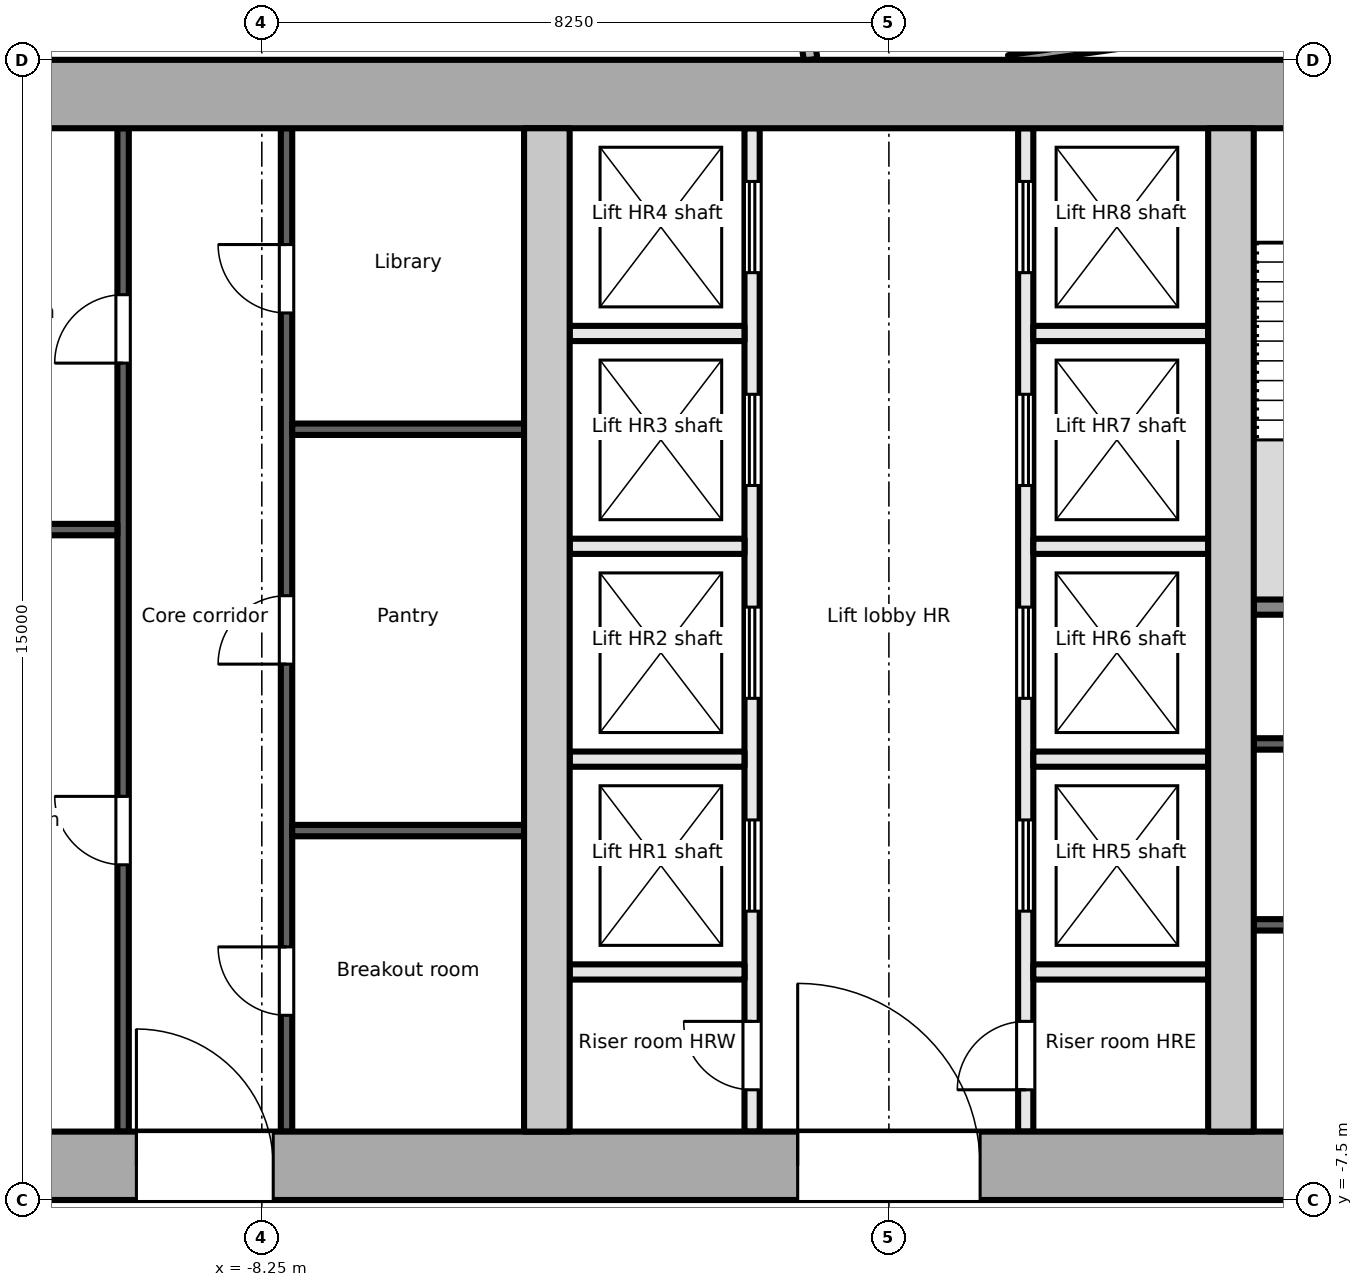
"""IFC4 building model, lengths in metres.
Left out: names, types, materials, properties, quantities, classifications, styles, units other than length and angle.
Written with IfcOpenShell. Run it as: python <this file> out.ifc"""

import sys

from ifc_helpers import new_model, si_unit, direction, frame, frame_2d, origin, place, context, subcontext, project, spatial, rectangle, extrude, element, fill, save


model = new_model("IFC4")
c1 = context("Model", 3, precision=1e-05, world=origin(), true_north=direction((0.0, 1.0)))
c2 = subcontext(c1, "Body", "Model", "MODEL_VIEW")
j1 = project(units=[si_unit("LENGTHUNIT", "METRE"), si_unit("PLANEANGLEUNIT", "RADIAN")], contexts=[c1])
p1 = place(None, origin())
s1 = spatial("IfcSite", under=j1, at=p1, CompositionType="ELEMENT")
p2 = place(p1, origin())
s2 = spatial("IfcBuilding", under=s1, at=p2, CompositionType="ELEMENT")
p3 = place(p2, frame((0.0, 0.0, 282.4)))
s3 = spatial("IfcBuildingStorey", under=s2, at=p3, CompositionType="ELEMENT", Elevation=282.4)
p4 = place(p3, frame((-18.0, -7.05, -0.2), z_axis=(0.0, 0.0, 1.0), x_axis=(1.0, 0.0, 0.0)))
e1 = element("IfcWall", 1, at=p4, inside=s3, PredefinedType="SHEAR", context=c2, shape_type="SweptSolid", body=[
    extrude(rectangle(XDim=36.0, YDim=0.9, at=frame_2d((18.0, 0.0))), origin(), (0.0, 0.0, 1.0), 3.9),
])
p5 = place(p4, frame((8.1, 0.0, 0.2)))
e2 = element("IfcOpeningElement", 2, at=p5, cuts=e1, PredefinedType="OPENING", context=c2, shape_type="SweptSolid", body=[
    extrude(rectangle(XDim=1.8, YDim=2.1, at=frame_2d((0.9, 1.05))), frame((0.0, 0.46, 0.0), z_axis=(0.0, -1.0, 0.0), x_axis=(1.0, 0.0, 0.0)), (0.0, 0.0, 1.0), 0.921),
])
p6 = place(p4, frame((16.8, 0.0, 0.2)))
e3 = element("IfcOpeningElement", 3, at=p6, cuts=e1, PredefinedType="OPENING", context=c2, shape_type="SweptSolid", body=[
    extrude(rectangle(XDim=2.4, YDim=2.1, at=frame_2d((1.2, 1.05))), frame((0.0, 0.46, 0.0), z_axis=(0.0, -1.0, 0.0), x_axis=(1.0, 0.0, 0.0)), (0.0, 0.0, 1.0), 0.921),
])
p7 = place(p4, frame((26.1, 0.0, 0.2)))
e4 = element("IfcOpeningElement", 4, at=p7, cuts=e1, PredefinedType="OPENING", context=c2, shape_type="SweptSolid", body=[
    extrude(rectangle(XDim=2.4, YDim=2.1, at=frame_2d((1.2, 1.05))), frame((0.0, 0.46, 0.0), z_axis=(0.0, -1.0, 0.0), x_axis=(1.0, 0.0, 0.0)), (0.0, 0.0, 1.0), 0.921),
])
p8 = place(p3, frame((-18.0, 7.05, -0.2), z_axis=(0.0, 0.0, 1.0), x_axis=(1.0, 0.0, 0.0)))
e5 = element("IfcWall", 5, at=p8, inside=s3, PredefinedType="SHEAR", context=c2, shape_type="SweptSolid", body=[
    extrude(rectangle(XDim=36.0, YDim=0.9, at=frame_2d((18.0, 0.0))), origin(), (0.0, 0.0, 1.0), 3.9),
])
for number, where, z_axis, x_axis in (
    (6, (-4.5, -6.6, -0.2), (0.0, 0.0, 1.0), (0.0, 1.0, 0.0)),
    (7, (4.5, -6.6, -0.2), (0.0, 0.0, 1.0), (0.0, 1.0, 0.0)),
):
    element("IfcWall", number, at=place(p3, frame(where, z_axis=z_axis, x_axis=x_axis)), inside=s3, PredefinedType="SHEAR", context=c2, shape_type="SweptSolid", body=[
        extrude(rectangle(XDim=13.2, YDim=0.6, at=frame_2d((6.6, 0.0))), origin(), (0.0, 0.0, 1.0), 3.9),
    ])
p9 = place(p3, frame((-10.075, -6.6, 0.0), z_axis=(0.0, 0.0, 1.0), x_axis=(0.0, 1.0, 0.0)))
e8 = element("IfcWall", 8, at=p9, inside=s3, PredefinedType="PARTITIONING", context=c2, shape_type="SweptSolid", body=[
    extrude(rectangle(XDim=13.2, YDim=0.15, at=frame_2d((6.6, 0.0))), origin(), (0.0, 0.0, 1.0), 3.7),
])
p10 = place(p9, frame((3.51, 0.0, 0.0)))
e9 = element("IfcOpeningElement", 9, at=p10, cuts=e8, PredefinedType="OPENING", context=c2, shape_type="SweptSolid", body=[
    extrude(rectangle(XDim=0.9, YDim=2.1, at=frame_2d((0.45, 1.05))), frame((0.0, 0.085, 0.0), z_axis=(0.0, -1.0, 0.0), x_axis=(1.0, 0.0, 0.0)), (0.0, 0.0, 1.0), 0.171),
])
p11 = place(p9, frame((10.11, 0.0, 0.0)))
e10 = element("IfcOpeningElement", 10, at=p11, cuts=e8, PredefinedType="OPENING", context=c2, shape_type="SweptSolid", body=[
    extrude(rectangle(XDim=0.9, YDim=2.1, at=frame_2d((0.45, 1.05))), frame((0.0, 0.085, 0.0), z_axis=(0.0, -1.0, 0.0), x_axis=(1.0, 0.0, 0.0)), (0.0, 0.0, 1.0), 0.171),
])
p12 = place(p3, frame((-13.2, 1.32, 0.0), z_axis=(0.0, 0.0, 1.0), x_axis=(1.0, 0.0, 0.0)))
e11 = element("IfcWall", 11, at=p12, inside=s3, PredefinedType="PARTITIONING", context=c2, shape_type="SweptSolid", body=[
    extrude(rectangle(XDim=3.05, YDim=0.15, at=frame_2d((1.525, 0.0))), origin(), (0.0, 0.0, 1.0), 3.7),
])
p13 = place(p3, frame((-7.925, -6.6, 0.0), z_axis=(0.0, 0.0, 1.0), x_axis=(0.0, 1.0, 0.0)))
e12 = element("IfcWall", 12, at=p13, inside=s3, PredefinedType="PARTITIONING", context=c2, shape_type="SweptSolid", body=[
    extrude(rectangle(XDim=13.2, YDim=0.15, at=frame_2d((6.6, 0.0))), origin(), (0.0, 0.0, 1.0), 3.7),
])
p14 = place(p13, frame((1.53, 0.0, 0.0)))
e13 = element("IfcOpeningElement", 13, at=p14, cuts=e12, PredefinedType="OPENING", context=c2, shape_type="SweptSolid", body=[
    extrude(rectangle(XDim=0.9, YDim=2.1, at=frame_2d((0.45, 1.05))), frame((0.0, 0.085, 0.0), z_axis=(0.0, -1.0, 0.0), x_axis=(1.0, 0.0, 0.0)), (0.0, 0.0, 1.0), 0.171),
])
p15 = place(p13, frame((6.15, 0.0, 0.0)))
e14 = element("IfcOpeningElement", 14, at=p15, cuts=e12, PredefinedType="OPENING", context=c2, shape_type="SweptSolid", body=[
    extrude(rectangle(XDim=0.9, YDim=2.1, at=frame_2d((0.45, 1.05))), frame((0.0, 0.085, 0.0), z_axis=(0.0, -1.0, 0.0), x_axis=(1.0, 0.0, 0.0)), (0.0, 0.0, 1.0), 0.171),
])
p16 = place(p13, frame((10.77, 0.0, 0.0)))
e15 = element("IfcOpeningElement", 15, at=p16, cuts=e12, PredefinedType="OPENING", context=c2, shape_type="SweptSolid", body=[
    extrude(rectangle(XDim=0.9, YDim=2.1, at=frame_2d((0.45, 1.05))), frame((0.0, 0.085, 0.0), z_axis=(0.0, -1.0, 0.0), x_axis=(1.0, 0.0, 0.0)), (0.0, 0.0, 1.0), 0.171),
])
for number, where, z_axis, x_axis in (
    (16, (-7.85, -2.64, 0.0), (0.0, 0.0, 1.0), (1.0, 0.0, 0.0)),
    (17, (-7.85, 2.64, 0.0), (0.0, 0.0, 1.0), (1.0, 0.0, 0.0)),
):
    element("IfcWall", number, at=place(p3, frame(where, z_axis=z_axis, x_axis=x_axis)), inside=s3, PredefinedType="PARTITIONING", context=c2, shape_type="SweptSolid", body=[
        extrude(rectangle(XDim=3.05, YDim=0.15, at=frame_2d((1.525, 0.0))), origin(), (0.0, 0.0, 1.0), 3.7),
    ])
p17 = place(p3, frame((-1.8, -6.6, 0.0), z_axis=(0.0, 0.0, 1.0), x_axis=(0.0, 1.0, 0.0)))
e18 = element("IfcWall", 18, at=p17, inside=s3, PredefinedType="PARTITIONING", context=c2, shape_type="SweptSolid", body=[
    extrude(rectangle(XDim=13.2, YDim=0.2, at=frame_2d((6.6, 0.0))), origin(), (0.0, 0.0, 1.0), 3.7),
])
p18 = place(p17, frame((0.55, 0.0, 0.0)))
e19 = element("IfcOpeningElement", 19, at=p18, cuts=e18, PredefinedType="OPENING", context=c2, shape_type="SweptSolid", body=[
    extrude(rectangle(XDim=0.9, YDim=2.1, at=frame_2d((0.45, 1.05))), frame((0.0, 0.111, 0.0), z_axis=(0.0, -1.0, 0.0), x_axis=(1.0, 0.0, 0.0)), (0.0, 0.0, 1.0), 0.221),
])
p19 = place(p17, frame((2.9, 0.0, 0.0)))
e20 = element("IfcOpeningElement", 20, at=p19, cuts=e18, PredefinedType="OPENING", context=c2, shape_type="SweptSolid", body=[
    extrude(rectangle(XDim=1.2, YDim=2.1, at=frame_2d((0.6, 1.05))), frame((0.0, 0.111, 0.0), z_axis=(0.0, -1.0, 0.0), x_axis=(1.0, 0.0, 0.0)), (0.0, 0.0, 1.0), 0.221),
])
p20 = place(p17, frame((5.7, 0.0, 0.0)))
e21 = element("IfcOpeningElement", 21, at=p20, cuts=e18, PredefinedType="OPENING", context=c2, shape_type="SweptSolid", body=[
    extrude(rectangle(XDim=1.2, YDim=2.1, at=frame_2d((0.6, 1.05))), frame((0.0, 0.111, 0.0), z_axis=(0.0, -1.0, 0.0), x_axis=(1.0, 0.0, 0.0)), (0.0, 0.0, 1.0), 0.221),
])
p21 = place(p17, frame((8.5, 0.0, 0.0)))
e22 = element("IfcOpeningElement", 22, at=p21, cuts=e18, PredefinedType="OPENING", context=c2, shape_type="SweptSolid", body=[
    extrude(rectangle(XDim=1.2, YDim=2.1, at=frame_2d((0.6, 1.05))), frame((0.0, 0.111, 0.0), z_axis=(0.0, -1.0, 0.0), x_axis=(1.0, 0.0, 0.0)), (0.0, 0.0, 1.0), 0.221),
])
p22 = place(p17, frame((11.3, 0.0, 0.0)))
e23 = element("IfcOpeningElement", 23, at=p22, cuts=e18, PredefinedType="OPENING", context=c2, shape_type="SweptSolid", body=[
    extrude(rectangle(XDim=1.2, YDim=2.1, at=frame_2d((0.6, 1.05))), frame((0.0, 0.111, 0.0), z_axis=(0.0, -1.0, 0.0), x_axis=(1.0, 0.0, 0.0)), (0.0, 0.0, 1.0), 0.221),
])
p23 = place(p3, frame((1.8, -6.6, 0.0), z_axis=(0.0, 0.0, 1.0), x_axis=(0.0, 1.0, 0.0)))
e24 = element("IfcWall", 24, at=p23, inside=s3, PredefinedType="PARTITIONING", context=c2, shape_type="SweptSolid", body=[
    extrude(rectangle(XDim=13.2, YDim=0.2, at=frame_2d((6.6, 0.0))), origin(), (0.0, 0.0, 1.0), 3.7),
])
p24 = place(p23, frame((0.55, 0.0, 0.0)))
e25 = element("IfcOpeningElement", 25, at=p24, cuts=e24, PredefinedType="OPENING", context=c2, shape_type="SweptSolid", body=[
    extrude(rectangle(XDim=0.9, YDim=2.1, at=frame_2d((0.45, 1.05))), frame((0.0, 0.111, 0.0), z_axis=(0.0, -1.0, 0.0), x_axis=(1.0, 0.0, 0.0)), (0.0, 0.0, 1.0), 0.221),
])
p25 = place(p23, frame((2.9, 0.0, 0.0)))
e26 = element("IfcOpeningElement", 26, at=p25, cuts=e24, PredefinedType="OPENING", context=c2, shape_type="SweptSolid", body=[
    extrude(rectangle(XDim=1.2, YDim=2.1, at=frame_2d((0.6, 1.05))), frame((0.0, 0.111, 0.0), z_axis=(0.0, -1.0, 0.0), x_axis=(1.0, 0.0, 0.0)), (0.0, 0.0, 1.0), 0.221),
])
p26 = place(p23, frame((5.7, 0.0, 0.0)))
e27 = element("IfcOpeningElement", 27, at=p26, cuts=e24, PredefinedType="OPENING", context=c2, shape_type="SweptSolid", body=[
    extrude(rectangle(XDim=1.2, YDim=2.1, at=frame_2d((0.6, 1.05))), frame((0.0, 0.111, 0.0), z_axis=(0.0, -1.0, 0.0), x_axis=(1.0, 0.0, 0.0)), (0.0, 0.0, 1.0), 0.221),
])
p27 = place(p23, frame((8.5, 0.0, 0.0)))
e28 = element("IfcOpeningElement", 28, at=p27, cuts=e24, PredefinedType="OPENING", context=c2, shape_type="SweptSolid", body=[
    extrude(rectangle(XDim=1.2, YDim=2.1, at=frame_2d((0.6, 1.05))), frame((0.0, 0.111, 0.0), z_axis=(0.0, -1.0, 0.0), x_axis=(1.0, 0.0, 0.0)), (0.0, 0.0, 1.0), 0.221),
])
p28 = place(p23, frame((11.3, 0.0, 0.0)))
e29 = element("IfcOpeningElement", 29, at=p28, cuts=e24, PredefinedType="OPENING", context=c2, shape_type="SweptSolid", body=[
    extrude(rectangle(XDim=1.2, YDim=2.1, at=frame_2d((0.6, 1.05))), frame((0.0, 0.111, 0.0), z_axis=(0.0, -1.0, 0.0), x_axis=(1.0, 0.0, 0.0)), (0.0, 0.0, 1.0), 0.221),
])
for number, where, z_axis, x_axis in (
    (30, (-4.2, -1.7, 0.0), (0.0, 0.0, 1.0), (1.0, 0.0, 0.0)),
    (31, (-4.2, 1.1, 0.0), (0.0, 0.0, 1.0), (1.0, 0.0, 0.0)),
    (32, (-4.2, 3.9, 0.0), (0.0, 0.0, 1.0), (1.0, 0.0, 0.0)),
    (33, (-4.2, -4.5, 0.0), (0.0, 0.0, 1.0), (1.0, 0.0, 0.0)),
    (34, (1.9, -1.7, 0.0), (0.0, 0.0, 1.0), (1.0, 0.0, 0.0)),
    (35, (1.9, 1.1, 0.0), (0.0, 0.0, 1.0), (1.0, 0.0, 0.0)),
    (36, (1.9, 3.9, 0.0), (0.0, 0.0, 1.0), (1.0, 0.0, 0.0)),
    (37, (1.9, -4.5, 0.0), (0.0, 0.0, 1.0), (1.0, 0.0, 0.0)),
):
    element("IfcWall", number, at=place(p3, frame(where, z_axis=z_axis, x_axis=x_axis)), inside=s3, PredefinedType="PARTITIONING", context=c2, shape_type="SweptSolid", body=[
        extrude(rectangle(XDim=2.3, YDim=0.2, at=frame_2d((1.15, 0.0))), origin(), (0.0, 0.0, 1.0), 3.7),
    ])
p29 = place(p3, frame((4.8, 0.3, 0.0), z_axis=(0.0, 0.0, 1.0), x_axis=(1.0, 0.0, 0.0)))
e38 = element("IfcWall", 38, at=p29, inside=s3, PredefinedType="PARTITIONING", context=c2, shape_type="SweptSolid", body=[
    extrude(rectangle(XDim=3.15, YDim=0.2, at=frame_2d((1.575, 0.0))), origin(), (0.0, 0.0, 1.0), 3.7),
])
for number, where, z_axis, x_axis in (
    (39, (4.8, -3.88, 0.0), (0.0, 0.0, 1.0), (1.0, 0.0, 0.0)),
    (40, (4.8, -1.5, 0.0), (0.0, 0.0, 1.0), (1.0, 0.0, 0.0)),
):
    element("IfcWall", number, at=place(p3, frame(where, z_axis=z_axis, x_axis=x_axis)), inside=s3, PredefinedType="PARTITIONING", context=c2, shape_type="SweptSolid", body=[
        extrude(rectangle(XDim=3.15, YDim=0.15, at=frame_2d((1.575, 0.0))), origin(), (0.0, 0.0, 1.0), 3.7),
    ])
p30 = place(p3, frame((-1.312, 9.506, 0.0), z_axis=(0.0, 0.0, 1.0), x_axis=(0.139193896019, -0.990265145964, 0.0)))
e41 = element("IfcWall", 41, at=p30, inside=s3, PredefinedType="PARTITIONING", context=c2, shape_type="SweptSolid", body=[
    extrude(rectangle(XDim=2.026, YDim=0.18, at=frame_2d((1.013, 0.0))), origin(), (0.0, 0.0, 1.0), 3.7),
])
p31 = place(p3, frame((1.576, 7.502, 0.0), z_axis=(0.0, 0.0, 1.0), x_axis=(0.990319013032, 0.138810130855, 0.0)))
e42 = element("IfcWall", 42, at=p31, inside=s3, PredefinedType="PARTITIONING", context=c2, shape_type="SweptSolid", body=[
    extrude(rectangle(XDim=1.859, YDim=0.12, at=frame_2d((0.93, 0.0))), origin(), (0.0, 0.0, 1.0), 3.7),
])
p32 = place(p10, origin())
e43 = element("IfcDoor", 43, at=p32, inside=s3, OperationType="SINGLE_SWING_RIGHT", PredefinedType="DOOR", context=c2, shape_type="SweptSolid", body=[
    extrude(rectangle(XDim=0.9, YDim=2.1, at=frame_2d((0.45, 1.05))), frame((0.0, 0.025, 0.0), z_axis=(0.0, -1.0, 0.0), x_axis=(1.0, 0.0, 0.0)), (0.0, 0.0, 1.0), 0.05),
])
fill(e9, e43)
p33 = place(p11, origin())
e44 = element("IfcDoor", 44, at=p33, inside=s3, OperationType="SINGLE_SWING_LEFT", PredefinedType="DOOR", context=c2, shape_type="SweptSolid", body=[
    extrude(rectangle(XDim=0.9, YDim=2.1, at=frame_2d((0.45, 1.05))), frame((0.0, 0.025, 0.0), z_axis=(0.0, -1.0, 0.0), x_axis=(1.0, 0.0, 0.0)), (0.0, 0.0, 1.0), 0.05),
])
fill(e10, e44)
p34 = place(p14, origin())
e45 = element("IfcDoor", 45, at=p34, inside=s3, OperationType="SINGLE_SWING_RIGHT", PredefinedType="DOOR", context=c2, shape_type="SweptSolid", body=[
    extrude(rectangle(XDim=0.9, YDim=2.1, at=frame_2d((0.45, 1.05))), frame((0.0, 0.025, 0.0), z_axis=(0.0, -1.0, 0.0), x_axis=(1.0, 0.0, 0.0)), (0.0, 0.0, 1.0), 0.05),
])
fill(e13, e45)
p35 = place(p15, origin())
e46 = element("IfcDoor", 46, at=p35, inside=s3, OperationType="SINGLE_SWING_LEFT", PredefinedType="DOOR", context=c2, shape_type="SweptSolid", body=[
    extrude(rectangle(XDim=0.9, YDim=2.1, at=frame_2d((0.45, 1.05))), frame((0.0, 0.025, 0.0), z_axis=(0.0, -1.0, 0.0), x_axis=(1.0, 0.0, 0.0)), (0.0, 0.0, 1.0), 0.05),
])
fill(e14, e46)
p36 = place(p16, origin())
e47 = element("IfcDoor", 47, at=p36, inside=s3, OperationType="SINGLE_SWING_RIGHT", PredefinedType="DOOR", context=c2, shape_type="SweptSolid", body=[
    extrude(rectangle(XDim=0.9, YDim=2.1, at=frame_2d((0.45, 1.05))), frame((0.0, 0.025, 0.0), z_axis=(0.0, -1.0, 0.0), x_axis=(1.0, 0.0, 0.0)), (0.0, 0.0, 1.0), 0.05),
])
fill(e15, e47)
p37 = place(p5, origin())
e48 = element("IfcDoor", 48, at=p37, inside=s3, OperationType="SINGLE_SWING_LEFT", PredefinedType="DOOR", context=c2, shape_type="SweptSolid", body=[
    extrude(rectangle(XDim=1.8, YDim=2.1, at=frame_2d((0.9, 1.05))), frame((0.0, 0.025, 0.0), z_axis=(0.0, -1.0, 0.0), x_axis=(1.0, 0.0, 0.0)), (0.0, 0.0, 1.0), 0.05),
])
fill(e2, e48)
p38 = place(p18, origin())
e49 = element("IfcDoor", 49, at=p38, inside=s3, OperationType="SINGLE_SWING_RIGHT", PredefinedType="DOOR", context=c2, shape_type="SweptSolid", body=[
    extrude(rectangle(XDim=0.9, YDim=2.1, at=frame_2d((0.45, 1.05))), frame((0.0, 0.025, 0.0), z_axis=(0.0, -1.0, 0.0), x_axis=(1.0, 0.0, 0.0)), (0.0, 0.0, 1.0), 0.05),
])
fill(e19, e49)
p39 = place(p19, origin())
e50 = element("IfcDoor", 50, at=p39, inside=s3, OperationType="DOUBLE_DOOR_SLIDING", PredefinedType="DOOR", context=c2, shape_type="SweptSolid", body=[
    extrude(rectangle(XDim=1.2, YDim=2.1, at=frame_2d((0.6, 1.05))), frame((0.0, 0.025, 0.0), z_axis=(0.0, -1.0, 0.0), x_axis=(1.0, 0.0, 0.0)), (0.0, 0.0, 1.0), 0.05),
])
fill(e20, e50)
p40 = place(p20, origin())
e51 = element("IfcDoor", 51, at=p40, inside=s3, OperationType="DOUBLE_DOOR_SLIDING", PredefinedType="DOOR", context=c2, shape_type="SweptSolid", body=[
    extrude(rectangle(XDim=1.2, YDim=2.1, at=frame_2d((0.6, 1.05))), frame((0.0, 0.025, 0.0), z_axis=(0.0, -1.0, 0.0), x_axis=(1.0, 0.0, 0.0)), (0.0, 0.0, 1.0), 0.05),
])
fill(e21, e51)
p41 = place(p21, origin())
e52 = element("IfcDoor", 52, at=p41, inside=s3, OperationType="DOUBLE_DOOR_SLIDING", PredefinedType="DOOR", context=c2, shape_type="SweptSolid", body=[
    extrude(rectangle(XDim=1.2, YDim=2.1, at=frame_2d((0.6, 1.05))), frame((0.0, 0.025, 0.0), z_axis=(0.0, -1.0, 0.0), x_axis=(1.0, 0.0, 0.0)), (0.0, 0.0, 1.0), 0.05),
])
fill(e22, e52)
p42 = place(p22, origin())
e53 = element("IfcDoor", 53, at=p42, inside=s3, OperationType="DOUBLE_DOOR_SLIDING", PredefinedType="DOOR", context=c2, shape_type="SweptSolid", body=[
    extrude(rectangle(XDim=1.2, YDim=2.1, at=frame_2d((0.6, 1.05))), frame((0.0, 0.025, 0.0), z_axis=(0.0, -1.0, 0.0), x_axis=(1.0, 0.0, 0.0)), (0.0, 0.0, 1.0), 0.05),
])
fill(e23, e53)
p43 = place(p24, origin())
e54 = element("IfcDoor", 54, at=p43, inside=s3, OperationType="SINGLE_SWING_LEFT", PredefinedType="DOOR", context=c2, shape_type="SweptSolid", body=[
    extrude(rectangle(XDim=0.9, YDim=2.1, at=frame_2d((0.45, 1.05))), frame((0.0, 0.025, 0.0), z_axis=(0.0, -1.0, 0.0), x_axis=(1.0, 0.0, 0.0)), (0.0, 0.0, 1.0), 0.05),
])
fill(e25, e54)
p44 = place(p25, origin())
e55 = element("IfcDoor", 55, at=p44, inside=s3, OperationType="DOUBLE_DOOR_SLIDING", PredefinedType="DOOR", context=c2, shape_type="SweptSolid", body=[
    extrude(rectangle(XDim=1.2, YDim=2.1, at=frame_2d((0.6, 1.05))), frame((0.0, 0.025, 0.0), z_axis=(0.0, -1.0, 0.0), x_axis=(1.0, 0.0, 0.0)), (0.0, 0.0, 1.0), 0.05),
])
fill(e26, e55)
p45 = place(p26, origin())
e56 = element("IfcDoor", 56, at=p45, inside=s3, OperationType="DOUBLE_DOOR_SLIDING", PredefinedType="DOOR", context=c2, shape_type="SweptSolid", body=[
    extrude(rectangle(XDim=1.2, YDim=2.1, at=frame_2d((0.6, 1.05))), frame((0.0, 0.025, 0.0), z_axis=(0.0, -1.0, 0.0), x_axis=(1.0, 0.0, 0.0)), (0.0, 0.0, 1.0), 0.05),
])
fill(e27, e56)
p46 = place(p27, origin())
e57 = element("IfcDoor", 57, at=p46, inside=s3, OperationType="DOUBLE_DOOR_SLIDING", PredefinedType="DOOR", context=c2, shape_type="SweptSolid", body=[
    extrude(rectangle(XDim=1.2, YDim=2.1, at=frame_2d((0.6, 1.05))), frame((0.0, 0.025, 0.0), z_axis=(0.0, -1.0, 0.0), x_axis=(1.0, 0.0, 0.0)), (0.0, 0.0, 1.0), 0.05),
])
fill(e28, e57)
p47 = place(p28, origin())
e58 = element("IfcDoor", 58, at=p47, inside=s3, OperationType="DOUBLE_DOOR_SLIDING", PredefinedType="DOOR", context=c2, shape_type="SweptSolid", body=[
    extrude(rectangle(XDim=1.2, YDim=2.1, at=frame_2d((0.6, 1.05))), frame((0.0, 0.025, 0.0), z_axis=(0.0, -1.0, 0.0), x_axis=(1.0, 0.0, 0.0)), (0.0, 0.0, 1.0), 0.05),
])
fill(e29, e58)
p48 = place(p6, origin())
e59 = element("IfcDoor", 59, at=p48, inside=s3, OperationType="DOUBLE_DOOR_DOUBLE_SWING", PredefinedType="DOOR", context=c2, shape_type="SweptSolid", body=[
    extrude(rectangle(XDim=2.4, YDim=2.1, at=frame_2d((1.2, 1.05))), frame((0.0, 0.025, 0.0), z_axis=(0.0, -1.0, 0.0), x_axis=(1.0, 0.0, 0.0)), (0.0, 0.0, 1.0), 0.05),
])
fill(e3, e59)
save(model, sys.argv[1])
